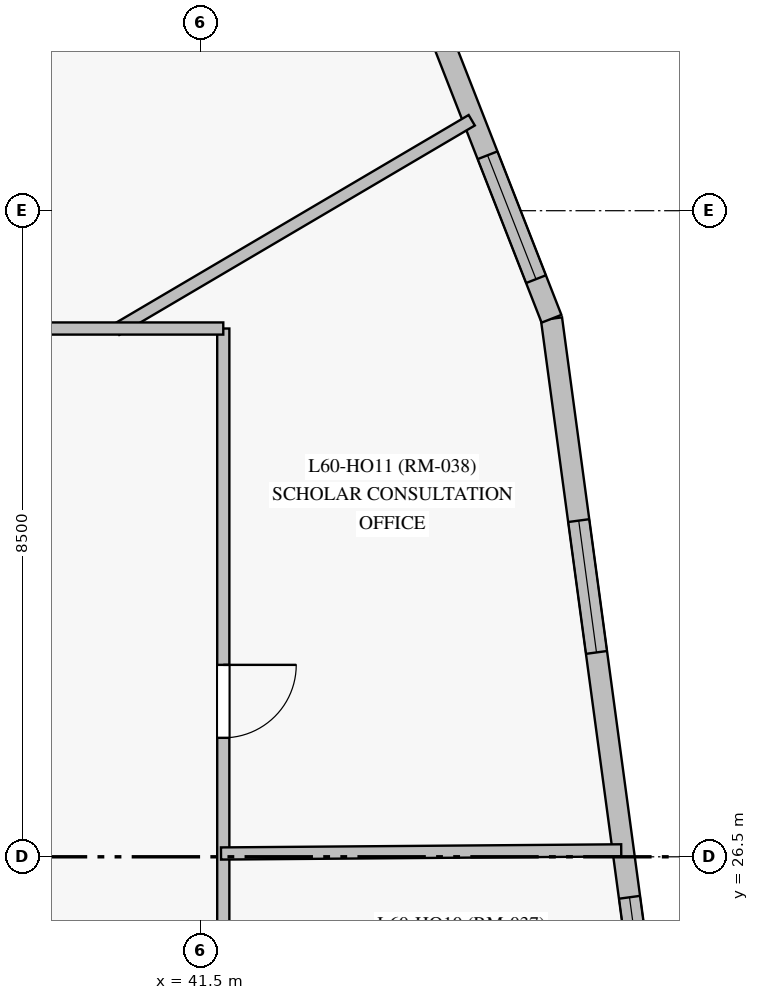
"""IFC4 building model, lengths in metres.
Left out: names, types, materials, properties, quantities, classifications, styles, units other than length and angle.
Written with IfcOpenShell. Run it as: python <this file> out.ifc"""

import sys

from ifc_helpers import new_model, si_unit, direction, frame, frame_2d, origin, origin_with_axes, place, context, subcontext, project, spatial, rectangle, extrude, source, transform, mapped, element, fill, save


model = new_model("IFC4")
c1 = context("Model", 3, precision=1e-05, world=origin(), true_north=direction((0.0, 1.0)))
c2 = subcontext(c1, "Body", "Model", "MODEL_VIEW")
j1 = project(units=[si_unit("LENGTHUNIT", "METRE"), si_unit("PLANEANGLEUNIT", "RADIAN")], contexts=[c1])
p1 = place(None, origin())
s1 = spatial("IfcSite", under=j1, at=p1, CompositionType="ELEMENT")
p2 = place(p1, origin())
s2 = spatial("IfcBuilding", under=s1, at=p2, CompositionType="ELEMENT")
p3 = place(p2, frame((0.0, 0.0, 205.35)))
s3 = spatial("IfcBuildingStorey", under=s2, at=p3, CompositionType="ELEMENT", Elevation=205.35)
p4 = place(p3, frame((47.364, 24.341, 0.0), z_axis=(0.0, 0.0, 1.0), x_axis=(-0.133639101201, 0.991030065452, 0.0)))
e1 = element("IfcWall", 1, at=p4, inside=s3, PredefinedType="SOLIDWALL", context=c2, shape_type="SweptSolid", body=[
    extrude(rectangle(XDim=9.321, YDim=0.28, at=frame_2d((4.66, 0.0))), origin(), (0.0, 0.0, 1.0), 2.775),
])
p5 = place(p4, frame((0.691, 0.0, 0.85)))
e2 = element("IfcOpeningElement", 2, at=p5, cuts=e1, PredefinedType="OPENING", context=c2, shape_type="SweptSolid", body=[
    extrude(rectangle(XDim=0.95, YDim=1.5, at=frame_2d((0.475, 0.75))), frame((0.0, 0.15, 0.0), z_axis=(0.0, -1.0, 0.0), x_axis=(1.0, 0.0, 0.0)), (0.0, 0.0, 1.0), 0.3),
])
p6 = place(p4, frame((4.891, 0.0, 0.85)))
e3 = element("IfcOpeningElement", 3, at=p6, cuts=e1, PredefinedType="OPENING", context=c2, shape_type="SweptSolid", body=[
    extrude(rectangle(XDim=1.75, YDim=1.65, at=frame_2d((0.875, 0.825))), frame((0.0, 0.15, 0.0), z_axis=(0.0, -1.0, 0.0), x_axis=(1.0, 0.0, 0.0)), (0.0, 0.0, 1.0), 0.3),
])
p7 = place(p3, frame((46.118, 33.578, 0.0), z_axis=(0.0, 0.0, 1.0), x_axis=(-0.364297776346, 0.931282518976, 0.0)))
e4 = element("IfcWall", 4, at=p7, inside=s3, PredefinedType="SOLIDWALL", context=c2, shape_type="SweptSolid", body=[
    extrude(rectangle(XDim=13.504, YDim=0.28, at=frame_2d((6.752, 0.0))), origin(), (0.0, 0.0, 1.0), 2.775),
])
p8 = place(p7, frame((0.56, 0.0, 0.85)))
e5 = element("IfcOpeningElement", 5, at=p8, cuts=e4, PredefinedType="OPENING", context=c2, shape_type="SweptSolid", body=[
    extrude(rectangle(XDim=1.75, YDim=1.65, at=frame_2d((0.875, 0.825))), frame((0.0, 0.15, 0.0), z_axis=(0.0, -1.0, 0.0), x_axis=(1.0, 0.0, 0.0)), (0.0, 0.0, 1.0), 0.3),
])
p9 = place(p7, frame((4.753, 0.0, 0.85)))
e6 = element("IfcOpeningElement", 6, at=p9, cuts=e4, PredefinedType="OPENING", context=c2, shape_type="SweptSolid", body=[
    extrude(rectangle(XDim=1.75, YDim=1.65, at=frame_2d((0.875, 0.825))), frame((0.0, 0.15, 0.0), z_axis=(0.0, -1.0, 0.0), x_axis=(1.0, 0.0, 0.0)), (0.0, 0.0, 1.0), 0.3),
])
p10 = place(p7, frame((9.75, 0.0, 0.85)))
e7 = element("IfcOpeningElement", 7, at=p10, cuts=e4, PredefinedType="OPENING", context=c2, shape_type="SweptSolid", body=[
    extrude(rectangle(XDim=1.75, YDim=1.65, at=frame_2d((0.875, 0.825))), frame((0.0, 0.15, 0.0), z_axis=(0.0, -1.0, 0.0), x_axis=(1.0, 0.0, 0.0)), (0.0, 0.0, 1.0), 0.3),
])
p11 = place(p3, frame((41.8, 33.45, 0.0), z_axis=(0.0, 0.0, 1.0), x_axis=(0.0, -1.0, 0.0)))
e8 = element("IfcWall", 8, at=p11, inside=s3, PredefinedType="PARTITIONING", context=c2, shape_type="SweptSolid", body=[
    extrude(rectangle(XDim=19.6, YDim=0.16, at=frame_2d((9.8, 0.0))), origin(), (0.0, 0.0, 1.0), 2.225),
])
p12 = place(p11, frame((9.325, 0.0, 0.0)))
e9 = element("IfcOpeningElement", 9, at=p12, cuts=e8, PredefinedType="OPENING", context=c2, shape_type="SweptSolid", body=[
    extrude(rectangle(XDim=0.96, YDim=2.15, at=frame_2d((0.48, 1.075))), frame((0.0, 0.09, 0.0), z_axis=(0.0, -1.0, 0.0), x_axis=(1.0, 0.0, 0.0)), (0.0, 0.0, 1.0), 0.18),
])
p13 = place(p11, frame((4.425, 0.0, 0.0)))
e10 = element("IfcOpeningElement", 10, at=p13, cuts=e8, PredefinedType="OPENING", context=c2, shape_type="SweptSolid", body=[
    extrude(rectangle(XDim=0.96, YDim=2.15, at=frame_2d((0.48, 1.075))), frame((0.0, 0.09, 0.0), z_axis=(0.0, -1.0, 0.0), x_axis=(1.0, 0.0, 0.0)), (0.0, 0.0, 1.0), 0.18),
])
p14 = place(p3, frame((40.391, 33.435, 0.0), z_axis=(0.0, 0.0, 1.0), x_axis=(0.861631176483, 0.507534940386, 0.0)))
e11 = element("IfcWall", 11, at=p14, inside=s3, PredefinedType="PARTITIONING", context=c2, shape_type="SweptSolid", body=[
    extrude(rectangle(XDim=5.429, YDim=0.16, at=frame_2d((2.714, 0.0))), origin(), (0.0, 0.0, 1.0), 2.775),
])
p15 = place(p3, frame((41.77, 26.543, 0.0), z_axis=(0.0, 0.0, 1.0), x_axis=(0.999969299607, 0.007835805241, 0.0)))
e12 = element("IfcWall", 12, at=p15, inside=s3, PredefinedType="PARTITIONING", context=c2, shape_type="SweptSolid", body=[
    extrude(rectangle(XDim=5.266, YDim=0.16, at=frame_2d((2.633, 0.0))), origin(), (0.0, 0.0, 1.0), 2.775),
])
p16 = place(p3, frame((37.707, 33.45, 0.0), z_axis=(0.0, 0.0, 1.0), x_axis=(1.0, 0.0, 0.0)))
e13 = element("IfcWall", 13, at=p16, inside=s3, PredefinedType="PARTITIONING", context=c2, shape_type="SweptSolid", body=[
    extrude(rectangle(XDim=4.093, YDim=0.16, at=frame_2d((2.046, 0.0))), origin(), (0.0, 0.0, 1.0), 2.775),
])
m1 = source(origin_with_axes(), c2, "Body", "SweptSolid", [
    extrude(rectangle(XDim=0.95, YDim=1.5, at=frame_2d((0.475, 0.75))), frame((0.0, 0.03, 0.0), z_axis=(0.0, -1.0, 0.0), x_axis=(1.0, 0.0, 0.0)), (0.0, 0.0, 1.0), 0.06),
])
p17 = place(p5, origin())
e14 = element("IfcWindow", 14, at=p17, inside=s3, PartitioningType="SINGLE_PANEL", PredefinedType="WINDOW", context=c2, shape_type="MappedRepresentation", body=[
    mapped(m1, transform((0.0, 0.0, 0.0), scale=1.0)),
])
fill(e2, e14)
m2 = source(origin_with_axes(), c2, "Body", "SweptSolid", [
    extrude(rectangle(XDim=1.75, YDim=1.65, at=frame_2d((0.875, 0.825))), frame((0.0, 0.03, 0.0), z_axis=(0.0, -1.0, 0.0), x_axis=(1.0, 0.0, 0.0)), (0.0, 0.0, 1.0), 0.06),
])
p18 = place(p6, origin())
e15 = element("IfcWindow", 15, at=p18, inside=s3, PartitioningType="SINGLE_PANEL", PredefinedType="WINDOW", context=c2, shape_type="MappedRepresentation", body=[
    mapped(m2, transform((0.0, 0.0, 0.0), scale=1.0)),
])
fill(e3, e15)
p19 = place(p8, origin())
e16 = element("IfcWindow", 16, at=p19, inside=s3, PartitioningType="SINGLE_PANEL", PredefinedType="WINDOW", context=c2, shape_type="MappedRepresentation", body=[
    mapped(m2, transform((0.0, 0.0, 0.0), scale=1.0)),
])
fill(e5, e16)
m3 = source(origin_with_axes(), c2, "Body", "SweptSolid", [
    extrude(rectangle(XDim=0.96, YDim=2.15, at=frame_2d((0.48, 1.075))), frame((0.0, 0.025, 0.0), z_axis=(0.0, -1.0, 0.0), x_axis=(1.0, 0.0, 0.0)), (0.0, 0.0, 1.0), 0.05),
])
p20 = place(p13, origin())
e17 = element("IfcDoor", 17, at=p20, inside=s3, OperationType="SINGLE_SWING_LEFT", PredefinedType="DOOR", context=c2, shape_type="MappedRepresentation", body=[
    mapped(m3, transform((0.0, 0.0, 0.0), scale=1.0)),
])
fill(e10, e17)
save(model, sys.argv[1])
